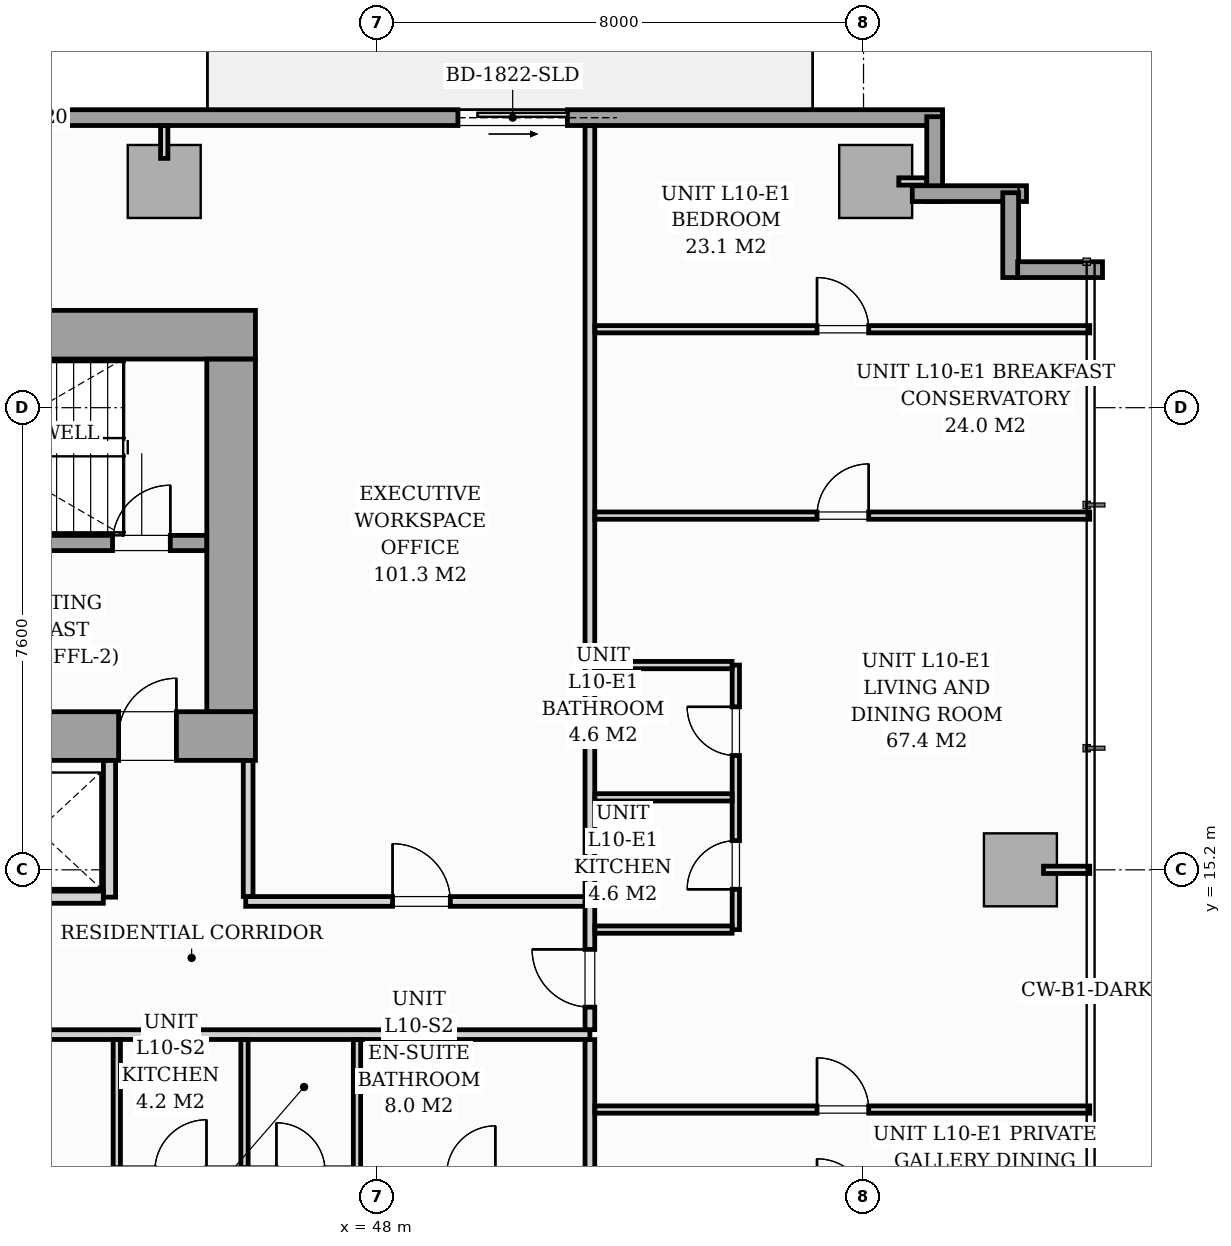
"""IFC4 building model, lengths in metres.
Left out: names, types, materials, properties, quantities, classifications, styles, units other than length and angle.
Written with IfcOpenShell. Run it as: python <this file> out.ifc"""

import sys

from ifc_helpers import new_model, si_unit, direction, frame, frame_2d, origin, origin_2d, place, context, subcontext, project, spatial, rectangle, i_section, extrude, source, transform, mapped, element, fill, save


model = new_model("IFC4")
c1 = context("Model", 3, precision=1e-05, world=origin(), true_north=direction((0.0, 1.0)))
c2 = subcontext(c1, "Body", "Model", "MODEL_VIEW")
j1 = project(units=[si_unit("LENGTHUNIT", "METRE"), si_unit("PLANEANGLEUNIT", "RADIAN")], contexts=[c1])
p1 = place(None, origin())
s1 = spatial("IfcSite", under=j1, at=p1, CompositionType="ELEMENT")
p2 = place(p1, origin())
s2 = spatial("IfcBuilding", under=s1, at=p2, CompositionType="ELEMENT")
p3 = place(p2, frame((0.0, 0.0, 39.0)))
s3 = spatial("IfcBuildingStorey", under=s2, at=p3, CompositionType="ELEMENT", Elevation=39.0)
m1 = source(origin(), c2, "Body", "SweptSolid", [
    extrude(i_section(OverallWidth=0.437, OverallDepth=0.514, WebThickness=0.061, FlangeThickness=0.097, FilletRadius=0.018, at=origin_2d()), origin(), (0.0, 0.0, 1.0), 3.196),
])
for number, where, z_axis, x_axis in (
    (1, (45.6, 17.4, 0.002), (0.0, 0.0, 1.0), (1.0, 0.0, 0.0)),
    (2, (45.6, 24.0, 0.002), (0.0, 0.0, 1.0), (1.0, 0.0, 0.0)),
):
    element("IfcColumn", number, at=place(p3, frame(where, z_axis=z_axis, x_axis=x_axis)), inside=s3, PredefinedType="PILASTER", context=c2, shape_type="MappedRepresentation", body=[
        mapped(m1, transform((0.0, 0.0, 0.0), scale=1.0)),
    ])
m2 = source(origin(), c2, "Body", "SweptSolid", [
    extrude(rectangle(XDim=1.2, YDim=1.2, at=origin_2d()), origin(), (0.0, 0.0, 1.0), 3.196),
])
for number, where, z_axis, x_axis in (
    (3, (44.5, 26.52, 0.002), (0.0, 0.0, 1.0), (1.0, 0.0, 0.0)),
    (4, (56.2, 26.52, 0.002), (0.0, 0.0, 1.0), (1.0, 0.0, 0.0)),
    (5, (58.58, 15.2, 0.002), (0.0, 0.0, 1.0), (1.0, 0.0, 0.0)),
):
    element("IfcColumn", number, at=place(p3, frame(where, z_axis=z_axis, x_axis=x_axis)), inside=s3, PredefinedType="COLUMN", context=c2, shape_type="MappedRepresentation", body=[
        mapped(m2, transform((0.0, 0.0, 0.0), scale=1.0)),
    ])
p4 = place(p3, frame((40.15, 27.57, 0.0), z_axis=(0.0, 0.0, 1.0), x_axis=(1.0, 0.0, 0.0)))
e6 = element("IfcWall", 6, at=p4, inside=s3, PredefinedType="STANDARD", context=c2, shape_type="SweptSolid", body=[
    extrude(rectangle(XDim=17.15, YDim=0.26, at=frame_2d((8.575, 0.0))), origin(), (0.0, 0.0, 1.0), 2.94),
])
p5 = place(p4, frame((9.18, 0.0, 0.0)))
e7 = element("IfcOpeningElement", 7, at=p5, cuts=e6, PredefinedType="OPENING", context=c2, shape_type="SweptSolid", body=[
    extrude(rectangle(XDim=1.8, YDim=2.06, at=frame_2d((0.9, 1.03))), frame((0.0, 0.14, 0.0), z_axis=(0.0, -1.0, 0.0), x_axis=(1.0, 0.0, 0.0)), (0.0, 0.0, 1.0), 0.28),
])
p6 = place(p4, frame((0.7, 0.0, 0.65)))
e8 = element("IfcOpeningElement", 8, at=p6, cuts=e6, PredefinedType="OPENING", context=c2, shape_type="SweptSolid", body=[
    extrude(rectangle(XDim=1.6, YDim=1.5, at=frame_2d((0.8, 0.75))), frame((0.0, 0.14, 0.0), z_axis=(0.0, -1.0, 0.0), x_axis=(1.0, 0.0, 0.0)), (0.0, 0.0, 1.0), 0.28),
])
p7 = place(p3, frame((57.17, 27.585, 0.0), z_axis=(0.0, 0.0, 1.0), x_axis=(0.0, -1.0, 0.0)))
e9 = element("IfcWall", 9, at=p7, inside=s3, PredefinedType="STANDARD", context=c2, shape_type="SweptSolid", body=[
    extrude(rectangle(XDim=1.395, YDim=0.26, at=frame_2d((0.698, 0.0))), origin(), (0.0, 0.0, 1.0), 2.94),
])
p8 = place(p3, frame((56.802, 26.32, 0.0), z_axis=(0.0, 0.0, 1.0), x_axis=(1.0, 0.0, 0.0)))
e10 = element("IfcWall", 10, at=p8, inside=s3, PredefinedType="STANDARD", context=c2, shape_type="SweptSolid", body=[
    extrude(rectangle(XDim=1.878, YDim=0.26, at=frame_2d((0.939, 0.0))), origin(), (0.0, 0.0, 1.0), 2.94),
])
for number, where, z_axis, x_axis in (
    (11, (58.42, 26.335, 0.0), (0.0, 0.0, 1.0), (0.0, -1.0, 0.0)),
    (12, (58.535, 25.07, 0.0), (0.0, 0.0, 1.0), (1.0, 0.0, 0.0)),
):
    element("IfcWall", number, at=place(p3, frame(where, z_axis=z_axis, x_axis=x_axis)), inside=s3, PredefinedType="STANDARD", context=c2, shape_type="SweptSolid", body=[
        extrude(rectangle(XDim=1.395, YDim=0.26, at=frame_2d((0.698, 0.0))), origin(), (0.0, 0.0, 1.0), 2.94),
    ])
p9 = place(p3, frame((26.0, 17.4, 0.0), z_axis=(0.0, 0.0, 1.0), x_axis=(1.0, 0.0, 0.0)))
e13 = element("IfcWall", 13, at=p9, inside=s3, PredefinedType="SHEAR", context=c2, shape_type="SweptSolid", body=[
    extrude(rectangle(XDim=20.0, YDim=0.8, at=frame_2d((10.0, 0.0))), origin(), (0.0, 0.0, 1.0), 3.2),
])
p10 = place(p9, frame((1.15, 0.0, 0.0)))
e14 = element("IfcOpeningElement", 14, at=p10, cuts=e13, PredefinedType="OPENING", context=c2, shape_type="SweptSolid", body=[
    extrude(rectangle(XDim=0.95, YDim=2.06, at=frame_2d((0.475, 1.03))), frame((0.0, 0.41, 0.0), z_axis=(0.0, -1.0, 0.0), x_axis=(1.0, 0.0, 0.0)), (0.0, 0.0, 1.0), 0.82),
])
p11 = place(p9, frame((9.58, 0.0, 0.0)))
e15 = element("IfcOpeningElement", 15, at=p11, cuts=e13, PredefinedType="OPENING", context=c2, shape_type="SweptSolid", body=[
    extrude(rectangle(XDim=0.85, YDim=2.0, at=frame_2d((0.425, 1.0))), frame((0.0, 0.41, 0.0), z_axis=(0.0, -1.0, 0.0), x_axis=(1.0, 0.0, 0.0)), (0.0, 0.0, 1.0), 0.82),
])
p12 = place(p9, frame((17.75, 0.0, 0.0)))
e16 = element("IfcOpeningElement", 16, at=p12, cuts=e13, PredefinedType="OPENING", context=c2, shape_type="SweptSolid", body=[
    extrude(rectangle(XDim=0.95, YDim=2.06, at=frame_2d((0.475, 1.03))), frame((0.0, 0.41, 0.0), z_axis=(0.0, -1.0, 0.0), x_axis=(1.0, 0.0, 0.0)), (0.0, 0.0, 1.0), 0.82),
])
p13 = place(p3, frame((26.0, 24.0, 0.0), z_axis=(0.0, 0.0, 1.0), x_axis=(1.0, 0.0, 0.0)))
e17 = element("IfcWall", 17, at=p13, inside=s3, PredefinedType="SHEAR", context=c2, shape_type="SweptSolid", body=[
    extrude(rectangle(XDim=20.0, YDim=0.8, at=frame_2d((10.0, 0.0))), origin(), (0.0, 0.0, 1.0), 3.2),
])
p14 = place(p3, frame((45.6, 17.802, 0.0), z_axis=(0.0, 0.0, 1.0), x_axis=(0.0, 1.0, 0.0)))
e18 = element("IfcWall", 18, at=p14, inside=s3, PredefinedType="SHEAR", context=c2, shape_type="SweptSolid", body=[
    extrude(rectangle(XDim=5.796, YDim=0.8, at=frame_2d((2.898, 0.0))), origin(), (0.0, 0.0, 1.0), 3.2),
])
p15 = place(p3, frame((37.05, 20.575, 0.0), z_axis=(0.0, 0.0, 1.0), x_axis=(1.0, 0.0, 0.0)))
e19 = element("IfcWall", 19, at=p15, inside=s3, PredefinedType="SOLIDWALL", context=c2, shape_type="SweptSolid", body=[
    extrude(rectangle(XDim=8.148, YDim=0.25, at=frame_2d((4.074, 0.0))), origin(), (0.0, 0.0, 1.0), 3.2),
])
p16 = place(p15, frame((6.6, 0.0, 0.0)))
e20 = element("IfcOpeningElement", 20, at=p16, cuts=e19, PredefinedType="OPENING", context=c2, shape_type="SweptSolid", body=[
    extrude(rectangle(XDim=0.95, YDim=2.06, at=frame_2d((0.475, 1.03))), frame((0.0, 0.135, 0.0), z_axis=(0.0, -1.0, 0.0), x_axis=(1.0, 0.0, 0.0)), (0.0, 0.0, 1.0), 0.27),
])
p17 = place(p3, frame((43.6, 14.75, 0.0), z_axis=(0.0, 0.0, 1.0), x_axis=(0.0, 1.0, 0.0)))
e21 = element("IfcWall", 21, at=p17, inside=s3, PredefinedType="PARTITIONING", context=c2, shape_type="SweptSolid", body=[
    extrude(rectangle(XDim=2.248, YDim=0.2, at=frame_2d((1.124, 0.0))), origin(), (0.0, 0.0, 1.0), 2.94),
])
p18 = place(p3, frame((41.352, 14.75, 0.0), z_axis=(0.0, 0.0, 1.0), x_axis=(1.0, 0.0, 0.0)))
e22 = element("IfcWall", 22, at=p18, inside=s3, PredefinedType="PARTITIONING", context=c2, shape_type="SweptSolid", body=[
    extrude(rectangle(XDim=2.146, YDim=0.2, at=frame_2d((1.073, 0.0))), origin(), (0.0, 0.0, 1.0), 2.94),
])
p19 = place(p3, frame((16.3, 12.49, 0.0), z_axis=(0.0, 0.0, 1.0), x_axis=(1.0, 0.0, 0.0)))
e23 = element("IfcWall", 23, at=p19, inside=s3, PredefinedType="PARTITIONING", context=c2, shape_type="SweptSolid", body=[
    extrude(rectangle(XDim=35.2, YDim=0.16, at=frame_2d((17.6, 0.0))), origin(), (0.0, 0.0, 1.0), 2.94),
])
p20 = place(p19, frame((11.072, 0.0, 0.0)))
e24 = element("IfcOpeningElement", 24, at=p20, cuts=e23, PredefinedType="OPENING", context=c2, shape_type="SweptSolid", body=[
    extrude(rectangle(XDim=0.95, YDim=2.06, at=frame_2d((0.475, 1.03))), frame((0.0, 0.09, 0.0), z_axis=(0.0, -1.0, 0.0), x_axis=(1.0, 0.0, 0.0)), (0.0, 0.0, 1.0), 0.18),
])
p21 = place(p19, frame((24.032, 0.0, 0.0)))
e25 = element("IfcOpeningElement", 25, at=p21, cuts=e23, PredefinedType="OPENING", context=c2, shape_type="SweptSolid", body=[
    extrude(rectangle(XDim=0.95, YDim=2.06, at=frame_2d((0.475, 1.03))), frame((0.0, 0.09, 0.0), z_axis=(0.0, -1.0, 0.0), x_axis=(1.0, 0.0, 0.0)), (0.0, 0.0, 1.0), 0.18),
])
p22 = place(p3, frame((51.5, 2.962, 0.0), z_axis=(0.0, 0.0, 1.0), x_axis=(0.0, 1.0, 0.0)))
e26 = element("IfcWall", 26, at=p22, inside=s3, PredefinedType="PARTITIONING", context=c2, shape_type="SweptSolid", body=[
    extrude(rectangle(XDim=9.446, YDim=0.16, at=frame_2d((4.723, 0.0))), origin(), (0.0, 0.0, 1.0), 2.94),
])
p23 = place(p3, frame((51.5, 12.572, 0.0), z_axis=(0.0, 0.0, 1.0), x_axis=(0.0, 1.0, 0.0)))
e27 = element("IfcWall", 27, at=p23, inside=s3, PredefinedType="PARTITIONING", context=c2, shape_type="SweptSolid", body=[
    extrude(rectangle(XDim=14.866, YDim=0.16, at=frame_2d((7.433, 0.0))), origin(), (0.0, 0.0, 1.0), 2.94),
])
p24 = place(p23, frame((0.37, 0.0, 0.0)))
e28 = element("IfcOpeningElement", 28, at=p24, cuts=e27, PredefinedType="OPENING", context=c2, shape_type="SweptSolid", body=[
    extrude(rectangle(XDim=0.95, YDim=2.06, at=frame_2d((0.475, 1.03))), frame((0.0, 0.09, 0.0), z_axis=(0.0, -1.0, 0.0), x_axis=(1.0, 0.0, 0.0)), (0.0, 0.0, 1.0), 0.18),
])
p25 = place(p3, frame((47.67, 2.962, 0.0), z_axis=(0.0, 0.0, 1.0), x_axis=(0.0, 1.0, 0.0)))
e29 = element("IfcWall", 29, at=p25, inside=s3, PredefinedType="PARTITIONING", context=c2, shape_type="SweptSolid", body=[
    extrude(rectangle(XDim=9.446, YDim=0.12, at=frame_2d((4.723, 0.0))), origin(), (0.0, 0.0, 1.0), 2.94),
])
p26 = place(p25, frame((6.178, 0.0, 0.0)))
e30 = element("IfcOpeningElement", 30, at=p26, cuts=e29, PredefinedType="OPENING", context=c2, shape_type="SweptSolid", body=[
    extrude(rectangle(XDim=0.9, YDim=2.05, at=frame_2d((0.45, 1.025))), frame((0.0, 0.07, 0.0), z_axis=(0.0, -1.0, 0.0), x_axis=(1.0, 0.0, 0.0)), (0.0, 0.0, 1.0), 0.14),
])
for number, where, z_axis, x_axis in (
    (31, (45.82, 10.302, 0.0), (0.0, 0.0, 1.0), (0.0, 1.0, 0.0)),
    (32, (43.72, 10.302, 0.0), (0.0, 0.0, 1.0), (0.0, 1.0, 0.0)),
):
    element("IfcWall", number, at=place(p3, frame(where, z_axis=z_axis, x_axis=x_axis)), inside=s3, PredefinedType="PARTITIONING", context=c2, shape_type="SweptSolid", body=[
        extrude(rectangle(XDim=2.106, YDim=0.12, at=frame_2d((1.053, 0.0))), origin(), (0.0, 0.0, 1.0), 2.94),
    ])
p27 = place(p3, frame((53.9, 14.217, 0.0), z_axis=(0.0, 0.0, 1.0), x_axis=(0.0, 1.0, 0.0)))
e33 = element("IfcWall", 33, at=p27, inside=s3, PredefinedType="PARTITIONING", context=c2, shape_type="SweptSolid", body=[
    extrude(rectangle(XDim=4.35, YDim=0.12, at=frame_2d((2.175, 0.0))), origin(), (0.0, 0.0, 1.0), 2.94),
])
p28 = place(p27, frame((0.663, 0.0, 0.0)))
e34 = element("IfcOpeningElement", 34, at=p28, cuts=e33, PredefinedType="OPENING", context=c2, shape_type="SweptSolid", body=[
    extrude(rectangle(XDim=0.8, YDim=2.0, at=frame_2d((0.4, 1.0))), frame((0.0, 0.07, 0.0), z_axis=(0.0, -1.0, 0.0), x_axis=(1.0, 0.0, 0.0)), (0.0, 0.0, 1.0), 0.14),
])
p29 = place(p27, frame((2.863, 0.0, 0.0)))
e35 = element("IfcOpeningElement", 35, at=p29, cuts=e33, PredefinedType="OPENING", context=c2, shape_type="SweptSolid", body=[
    extrude(rectangle(XDim=0.8, YDim=2.02, at=frame_2d((0.4, 1.01))), frame((0.0, 0.07, 0.0), z_axis=(0.0, -1.0, 0.0), x_axis=(1.0, 0.0, 0.0)), (0.0, 0.0, 1.0), 0.14),
])
p30 = place(p3, frame((51.582, 16.392, 0.0), z_axis=(0.0, 0.0, 1.0), x_axis=(1.0, 0.0, 0.0)))
e36 = element("IfcWall", 36, at=p30, inside=s3, PredefinedType="PARTITIONING", context=c2, shape_type="SweptSolid", body=[
    extrude(rectangle(XDim=2.256, YDim=0.12, at=frame_2d((1.128, 0.0))), origin(), (0.0, 0.0, 1.0), 2.045),
])
for number, where, z_axis, x_axis in (
    (37, (51.582, 14.217, 0.0), (0.0, 0.0, 1.0), (1.0, 0.0, 0.0)),
    (38, (51.582, 18.567, 0.0), (0.0, 0.0, 1.0), (1.0, 0.0, 0.0)),
):
    element("IfcWall", number, at=place(p3, frame(where, z_axis=z_axis, x_axis=x_axis)), inside=s3, PredefinedType="PARTITIONING", context=c2, shape_type="SweptSolid", body=[
        extrude(rectangle(XDim=2.256, YDim=0.12, at=frame_2d((1.128, 0.0))), origin(), (0.0, 0.0, 1.0), 2.94),
    ])
p31 = place(p3, frame((51.582, 24.09, 0.0), z_axis=(0.0, 0.0, 1.0), x_axis=(1.0, 0.0, 0.0)))
e39 = element("IfcWall", 39, at=p31, inside=s3, PredefinedType="PARTITIONING", context=c2, shape_type="SweptSolid", body=[
    extrude(rectangle(XDim=8.138, YDim=0.12, at=frame_2d((4.069, 0.0))), origin(), (0.0, 0.0, 1.0), 2.94),
])
p32 = place(p31, frame((3.653, 0.0, 0.0)))
e40 = element("IfcOpeningElement", 40, at=p32, cuts=e39, PredefinedType="OPENING", context=c2, shape_type="SweptSolid", body=[
    extrude(rectangle(XDim=0.85, YDim=2.05, at=frame_2d((0.425, 1.025))), frame((0.0, 0.07, 0.0), z_axis=(0.0, -1.0, 0.0), x_axis=(1.0, 0.0, 0.0)), (0.0, 0.0, 1.0), 0.14),
])
p33 = place(p3, frame((51.582, 21.025, 0.0), z_axis=(0.0, 0.0, 1.0), x_axis=(1.0, 0.0, 0.0)))
e41 = element("IfcWall", 41, at=p33, inside=s3, PredefinedType="PARTITIONING", context=c2, shape_type="SweptSolid", body=[
    extrude(rectangle(XDim=8.138, YDim=0.12, at=frame_2d((4.069, 0.0))), origin(), (0.0, 0.0, 1.0), 2.94),
])
p34 = place(p33, frame((3.653, 0.0, 0.0)))
e42 = element("IfcOpeningElement", 42, at=p34, cuts=e41, PredefinedType="OPENING", context=c2, shape_type="SweptSolid", body=[
    extrude(rectangle(XDim=0.85, YDim=2.05, at=frame_2d((0.425, 1.025))), frame((0.0, 0.07, 0.0), z_axis=(0.0, -1.0, 0.0), x_axis=(1.0, 0.0, 0.0)), (0.0, 0.0, 1.0), 0.14),
])
p35 = place(p3, frame((51.582, 11.258, 0.0), z_axis=(0.0, 0.0, 1.0), x_axis=(1.0, 0.0, 0.0)))
e43 = element("IfcWall", 43, at=p35, inside=s3, PredefinedType="PARTITIONING", context=c2, shape_type="SweptSolid", body=[
    extrude(rectangle(XDim=8.138, YDim=0.12, at=frame_2d((4.069, 0.0))), origin(), (0.0, 0.0, 1.0), 2.94),
])
p36 = place(p35, frame((3.653, 0.0, 0.0)))
e44 = element("IfcOpeningElement", 44, at=p36, cuts=e43, PredefinedType="OPENING", context=c2, shape_type="SweptSolid", body=[
    extrude(rectangle(XDim=0.85, YDim=2.05, at=frame_2d((0.425, 1.025))), frame((0.0, 0.07, 0.0), z_axis=(0.0, -1.0, 0.0), x_axis=(1.0, 0.0, 0.0)), (0.0, 0.0, 1.0), 0.14),
])
p37 = place(p3, frame((45.84, 14.68, 0.0), z_axis=(0.0, 0.0, 1.0), x_axis=(1.0, 0.0, 0.0)))
e45 = element("IfcWall", 45, at=p37, inside=s3, PredefinedType="PARTITIONING", context=c2, shape_type="SweptSolid", body=[
    extrude(rectangle(XDim=5.578, YDim=0.16, at=frame_2d((2.789, 0.0))), origin(), (0.0, 0.0, 1.0), 2.94),
])
p38 = place(p37, frame((2.415, 0.0, 0.0)))
e46 = element("IfcOpeningElement", 46, at=p38, cuts=e45, PredefinedType="OPENING", context=c2, shape_type="SweptSolid", body=[
    extrude(rectangle(XDim=0.95, YDim=2.06, at=frame_2d((0.475, 1.03))), frame((0.0, 0.09, 0.0), z_axis=(0.0, -1.0, 0.0), x_axis=(1.0, 0.0, 0.0)), (0.0, 0.0, 1.0), 0.18),
])
p39 = place(p3, frame((45.88, 14.762, 0.0), z_axis=(0.0, 0.0, 1.0), x_axis=(0.0, 1.0, 0.0)))
e47 = element("IfcWall", 47, at=p39, inside=s3, PredefinedType="PARTITIONING", context=c2, shape_type="SweptSolid", body=[
    extrude(rectangle(XDim=2.236, YDim=0.16, at=frame_2d((1.118, 0.0))), origin(), (0.0, 0.0, 1.0), 2.94),
])
p40 = place(p3, frame((44.5, 26.9, 0.0), z_axis=(0.0, 0.0, 1.0), x_axis=(0.0, 1.0, 0.0)))
e48 = element("IfcWall", 48, at=p40, inside=s3, PredefinedType="PARTITIONING", context=c2, shape_type="SweptSolid", body=[
    extrude(rectangle(XDim=0.538, YDim=0.12, at=frame_2d((0.269, 0.0))), origin(), (0.0, 0.0, 1.0), 2.94),
])
p41 = place(p3, frame((56.58, 26.52, 0.0), z_axis=(0.0, 0.0, 1.0), x_axis=(1.0, 0.0, 0.0)))
e49 = element("IfcWall", 49, at=p41, inside=s3, PredefinedType="PARTITIONING", context=c2, shape_type="SweptSolid", body=[
    extrude(rectangle(XDim=0.458, YDim=0.12, at=frame_2d((0.229, 0.0))), origin(), (0.0, 0.0, 1.0), 2.94),
])
p42 = place(p3, frame((58.96, 15.2, 0.0), z_axis=(0.0, 0.0, 1.0), x_axis=(1.0, 0.0, 0.0)))
e50 = element("IfcWall", 50, at=p42, inside=s3, PredefinedType="PARTITIONING", context=c2, shape_type="SweptSolid", body=[
    extrude(rectangle(XDim=0.76, YDim=0.12, at=frame_2d((0.38, 0.0))), origin(), (0.0, 0.0, 1.0), 2.94),
])
m3 = source(origin(), c2, "Body", "SweptSolid", [
    extrude(rectangle(XDim=1.8, YDim=2.06, at=frame_2d((0.9, 1.03))), frame((0.0, 0.025, 0.0), z_axis=(0.0, -1.0, 0.0), x_axis=(1.0, 0.0, 0.0)), (0.0, 0.0, 1.0), 0.05),
])
p43 = place(p5, origin())
e51 = element("IfcDoor", 51, at=p43, inside=s3, OperationType="SLIDING_TO_RIGHT", PredefinedType="DOOR", context=c2, shape_type="MappedRepresentation", body=[
    mapped(m3, transform((0.0, 0.0, 0.0), scale=1.0)),
])
fill(e7, e51)
m4 = source(origin(), c2, "Body", "SweptSolid", [
    extrude(rectangle(XDim=0.95, YDim=2.06, at=frame_2d((0.475, 1.03))), frame((0.0, 0.025, 0.0), z_axis=(0.0, -1.0, 0.0), x_axis=(1.0, 0.0, 0.0)), (0.0, 0.0, 1.0), 0.05),
])
p44 = place(p12, origin())
e52 = element("IfcDoor", 52, at=p44, inside=s3, OperationType="SINGLE_SWING_RIGHT", PredefinedType="DOOR", context=c2, shape_type="MappedRepresentation", body=[
    mapped(m4, transform((0.0, 0.0, 0.0), scale=1.0)),
])
fill(e16, e52)
p45 = place(p16, origin())
e53 = element("IfcDoor", 53, at=p45, inside=s3, OperationType="SINGLE_SWING_RIGHT", PredefinedType="DOOR", context=c2, shape_type="MappedRepresentation", body=[
    mapped(m4, transform((0.0, 0.0, 0.0), scale=1.0)),
])
fill(e20, e53)
m5 = source(origin(), c2, "Body", "SweptSolid", [
    extrude(rectangle(XDim=0.95, YDim=2.06, at=frame_2d((0.475, 1.03))), frame((0.0, 0.025, 0.0), z_axis=(0.0, -1.0, 0.0), x_axis=(1.0, 0.0, 0.0)), (0.0, 0.0, 1.0), 0.05),
])
p46 = place(p24, origin())
e54 = element("IfcDoor", 54, at=p46, inside=s3, OperationType="SINGLE_SWING_RIGHT", PredefinedType="DOOR", context=c2, shape_type="MappedRepresentation", body=[
    mapped(m5, transform((0.0, 0.0, 0.0), scale=1.0)),
])
fill(e28, e54)
m6 = source(origin(), c2, "Body", "SweptSolid", [
    extrude(rectangle(XDim=0.8, YDim=2.0, at=frame_2d((0.4, 1.0))), frame((0.0, 0.025, 0.0), z_axis=(0.0, -1.0, 0.0), x_axis=(1.0, 0.0, 0.0)), (0.0, 0.0, 1.0), 0.05),
])
p47 = place(p28, origin())
e55 = element("IfcDoor", 55, at=p47, inside=s3, OperationType="SINGLE_SWING_LEFT", PredefinedType="DOOR", context=c2, shape_type="MappedRepresentation", body=[
    mapped(m6, transform((0.0, 0.0, 0.0), scale=1.0)),
])
fill(e34, e55)
m7 = source(origin(), c2, "Body", "SweptSolid", [
    extrude(rectangle(XDim=0.8, YDim=2.02, at=frame_2d((0.4, 1.01))), frame((0.0, 0.025, 0.0), z_axis=(0.0, -1.0, 0.0), x_axis=(1.0, 0.0, 0.0)), (0.0, 0.0, 1.0), 0.05),
])
p48 = place(p29, origin())
e56 = element("IfcDoor", 56, at=p48, inside=s3, OperationType="SINGLE_SWING_RIGHT", PredefinedType="DOOR", context=c2, shape_type="MappedRepresentation", body=[
    mapped(m7, transform((0.0, 0.0, 0.0), scale=1.0)),
])
fill(e35, e56)
m8 = source(origin(), c2, "Body", "SweptSolid", [
    extrude(rectangle(XDim=0.85, YDim=2.05, at=frame_2d((0.425, 1.025))), frame((0.0, 0.025, 0.0), z_axis=(0.0, -1.0, 0.0), x_axis=(1.0, 0.0, 0.0)), (0.0, 0.0, 1.0), 0.05),
])
p49 = place(p32, origin())
e57 = element("IfcDoor", 57, at=p49, inside=s3, OperationType="SINGLE_SWING_LEFT", PredefinedType="DOOR", context=c2, shape_type="MappedRepresentation", body=[
    mapped(m8, transform((0.0, 0.0, 0.0), scale=1.0)),
])
fill(e40, e57)
p50 = place(p34, origin())
e58 = element("IfcDoor", 58, at=p50, inside=s3, OperationType="SINGLE_SWING_RIGHT", PredefinedType="DOOR", context=c2, shape_type="MappedRepresentation", body=[
    mapped(m8, transform((0.0, 0.0, 0.0), scale=1.0)),
])
fill(e42, e58)
p51 = place(p36, origin())
e59 = element("IfcDoor", 59, at=p51, inside=s3, OperationType="SINGLE_SWING_LEFT", PredefinedType="DOOR", context=c2, shape_type="MappedRepresentation", body=[
    mapped(m8, transform((0.0, 0.0, 0.0), scale=1.0)),
])
fill(e44, e59)
p52 = place(p38, origin())
e60 = element("IfcDoor", 60, at=p52, inside=s3, OperationType="SINGLE_SWING_LEFT", PredefinedType="DOOR", context=c2, shape_type="MappedRepresentation", body=[
    mapped(m5, transform((0.0, 0.0, 0.0), scale=1.0)),
])
fill(e46, e60)
save(model, sys.argv[1])
